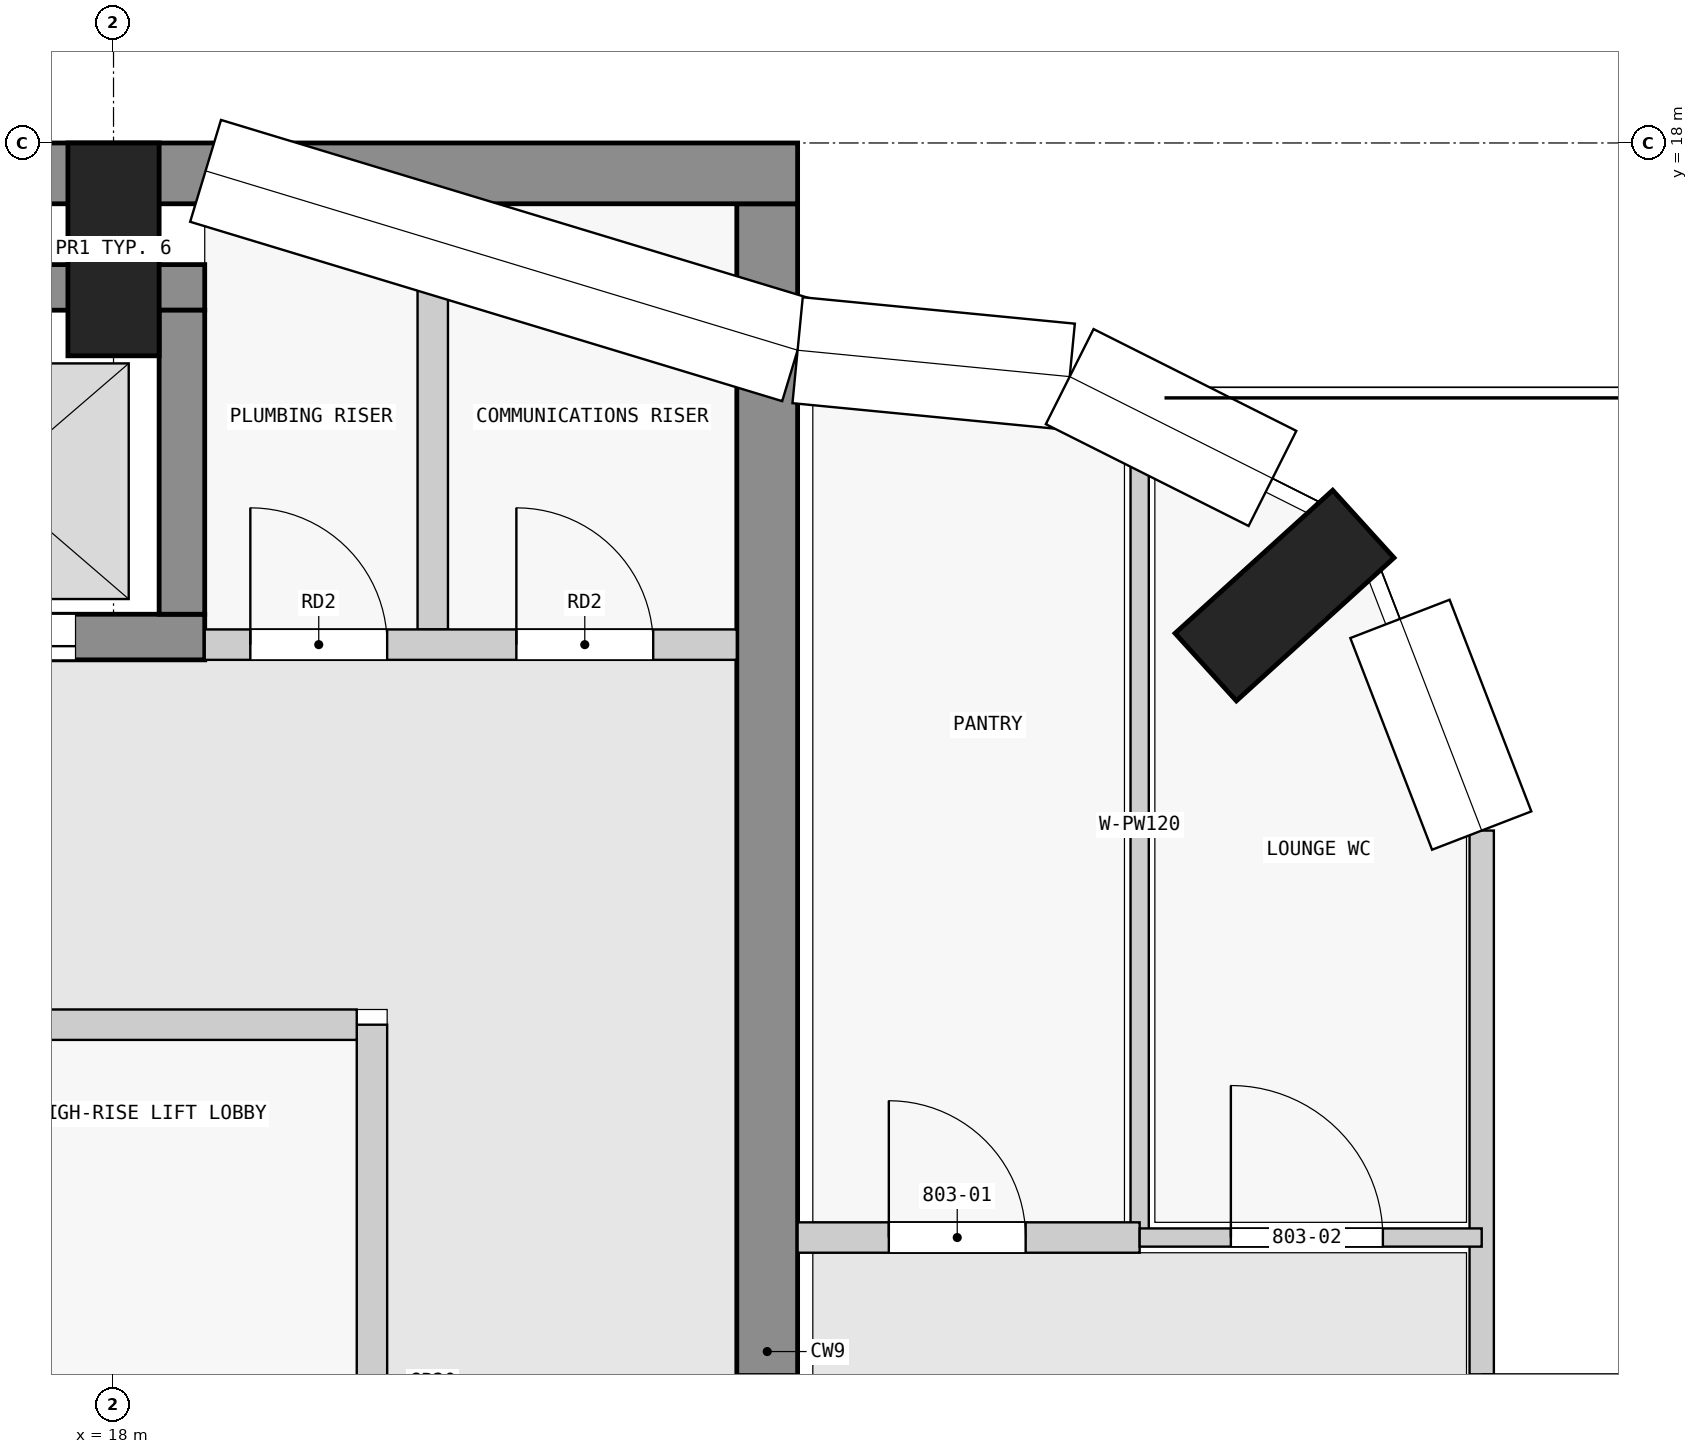
"""IFC4 building model, lengths in metres.
Left out: names, types, materials, properties, quantities, classifications, styles, units other than length and angle.
Written with IfcOpenShell. Run it as: python <this file> out.ifc"""

import sys

from ifc_helpers import new_model, si_unit, direction, frame, frame_2d, origin, origin_2d, place, context, subcontext, project, spatial, rectangle, extrude, element, fill, save


model = new_model("IFC4")
c1 = context("Model", 3, precision=1e-05, world=origin(), true_north=direction((0.0, 1.0)))
c2 = subcontext(c1, "Body", "Model", "MODEL_VIEW")
j1 = project(units=[si_unit("LENGTHUNIT", "METRE"), si_unit("PLANEANGLEUNIT", "RADIAN")], contexts=[c1])
p1 = place(None, origin())
s1 = spatial("IfcSite", under=j1, at=p1, CompositionType="ELEMENT")
p2 = place(p1, origin())
s2 = spatial("IfcBuilding", under=s1, at=p2, CompositionType="ELEMENT")
p3 = place(p2, frame((0.0, 0.0, 301.9)))
s3 = spatial("IfcBuildingStorey", under=s2, at=p3, CompositionType="ELEMENT", Elevation=301.9)
for number, where, z_axis, x_axis in (
    (1, (25.703, 15.023, 0.0), (0.0, 0.0, 1.0), (-0.672, 0.74, 0.0)),
    (2, (18.0, 17.3, 0.0), (0.0, 0.0, 1.0), (1.0, 0.0, 0.0)),
):
    element("IfcColumn", number, at=place(p3, frame(where, z_axis=z_axis, x_axis=x_axis)), inside=s3, PredefinedType="COLUMN", context=c2, shape_type="SweptSolid", body=[
        extrude(rectangle(XDim=0.6, YDim=1.4, at=origin_2d()), origin(), (0.0, 0.0, 1.0), 3.5),
    ])
p4 = place(p3, frame((1.9, 17.8, 0.0), z_axis=(0.0, 0.0, 1.0), x_axis=(1.0, 0.0, 0.0)))
e3 = element("IfcWall", 3, at=p4, inside=s3, PredefinedType="SHEAR", context=c2, shape_type="SweptSolid", body=[
    extrude(rectangle(XDim=20.6, YDim=0.4, at=frame_2d((10.3, 0.0))), origin(), (0.0, 0.0, 1.0), 3.25),
])
p5 = place(p3, frame((22.3, 2.5, 0.0), z_axis=(0.0, 0.0, 1.0), x_axis=(0.0, 1.0, 0.0)))
e4 = element("IfcWall", 4, at=p5, inside=s3, PredefinedType="SHEAR", context=c2, shape_type="SweptSolid", body=[
    extrude(rectangle(XDim=15.1, YDim=0.4, at=frame_2d((7.55, 0.0))), origin(), (0.0, 0.0, 1.0), 3.25),
])
p6 = place(p5, frame((5.6, 0.0, 0.0)))
e5 = element("IfcOpeningElement", 5, at=p6, cuts=e4, PredefinedType="OPENING", context=c2, shape_type="SweptSolid", body=[
    extrude(rectangle(XDim=1.8, YDim=2.1, at=frame_2d((0.9, 1.05))), frame((0.0, 0.21, 0.0), z_axis=(0.0, -1.0, 0.0), x_axis=(1.0, 0.0, 0.0)), (0.0, 0.0, 1.0), 0.42),
])
p7 = place(p3, frame((10.8, 17.05, 0.0), z_axis=(0.0, 0.0, 1.0), x_axis=(1.0, 0.0, 0.0)))
e6 = element("IfcWall", 6, at=p7, inside=s3, PredefinedType="SHEAR", context=c2, shape_type="SweptSolid", body=[
    extrude(rectangle(XDim=7.8, YDim=0.3, at=frame_2d((3.9, 0.0))), origin(), (0.0, 0.0, 1.0), 3.25),
])
p8 = place(p3, frame((10.8, 14.75, 0.0), z_axis=(0.0, 0.0, 1.0), x_axis=(1.0, 0.0, 0.0)))
e7 = element("IfcWall", 7, at=p8, inside=s3, PredefinedType="SHEAR", context=c2, shape_type="SweptSolid", body=[
    extrude(rectangle(XDim=7.8, YDim=0.3, at=frame_2d((3.9, 0.0))), origin(), (0.0, 0.0, 1.0), 3.25),
])
p9 = place(p8, frame((0.85, 0.0, 0.0)))
e8 = element("IfcOpeningElement", 8, at=p9, cuts=e7, PredefinedType="OPENING", context=c2, shape_type="SweptSolid", body=[
    extrude(rectangle(XDim=1.1, YDim=2.1, at=frame_2d((0.55, 1.05))), frame((0.0, 0.16, 0.0), z_axis=(0.0, -1.0, 0.0), x_axis=(1.0, 0.0, 0.0)), (0.0, 0.0, 1.0), 0.32),
])
p10 = place(p8, frame((3.35, 0.0, 0.0)))
e9 = element("IfcOpeningElement", 9, at=p10, cuts=e7, PredefinedType="OPENING", context=c2, shape_type="SweptSolid", body=[
    extrude(rectangle(XDim=1.1, YDim=2.1, at=frame_2d((0.55, 1.05))), frame((0.0, 0.16, 0.0), z_axis=(0.0, -1.0, 0.0), x_axis=(1.0, 0.0, 0.0)), (0.0, 0.0, 1.0), 0.32),
])
p11 = place(p8, frame((5.85, 0.0, 0.0)))
e10 = element("IfcOpeningElement", 10, at=p11, cuts=e7, PredefinedType="OPENING", context=c2, shape_type="SweptSolid", body=[
    extrude(rectangle(XDim=1.1, YDim=2.1, at=frame_2d((0.55, 1.05))), frame((0.0, 0.16, 0.0), z_axis=(0.0, -1.0, 0.0), x_axis=(1.0, 0.0, 0.0)), (0.0, 0.0, 1.0), 0.32),
])
p12 = place(p3, frame((18.45, 14.9, 0.0), z_axis=(0.0, 0.0, 1.0), x_axis=(0.0, 1.0, 0.0)))
e11 = element("IfcWall", 11, at=p12, inside=s3, PredefinedType="SHEAR", context=c2, shape_type="SweptSolid", body=[
    extrude(rectangle(XDim=2.0, YDim=0.3, at=frame_2d((1.0, 0.0))), origin(), (0.0, 0.0, 1.0), 3.25),
])
p13 = place(p3, frame((27.0, 13.477, 0.0), z_axis=(0.0, 0.0, 1.0), x_axis=(0.0, -1.0, 0.0)))
e12 = element("IfcWall", 12, at=p13, inside=s3, PredefinedType="STANDARD", context=c2, shape_type="SweptSolid", body=[
    extrude(rectangle(XDim=8.954, YDim=0.16, at=frame_2d((4.477, 0.0))), origin(), (0.0, 0.0, 1.0), 3.25),
])
p14 = place(p13, frame((3.577, 0.0, 0.0)))
e13 = element("IfcOpeningElement", 13, at=p14, cuts=e12, PredefinedType="OPENING", context=c2, shape_type="SweptSolid", body=[
    extrude(rectangle(XDim=1.8, YDim=2.4, at=frame_2d((0.9, 1.2))), frame((0.0, 0.09, 0.0), z_axis=(0.0, -1.0, 0.0), x_axis=(1.0, 0.0, 0.0)), (0.0, 0.0, 1.0), 0.18),
])
p15 = place(p3, frame((19.7, 7.5, 0.0), z_axis=(0.0, 0.0, 1.0), x_axis=(0.0, 1.0, 0.0)))
e14 = element("IfcWall", 14, at=p15, inside=s3, PredefinedType="PARTITIONING", context=c2, shape_type="SweptSolid", body=[
    extrude(rectangle(XDim=4.7, YDim=0.2, at=frame_2d((2.35, 0.0))), origin(), (0.0, 0.0, 1.0), 3.25),
])
p16 = place(p3, frame((10.9, 12.2, 0.0), z_axis=(0.0, 0.0, 1.0), x_axis=(1.0, 0.0, 0.0)))
e15 = element("IfcWall", 15, at=p16, inside=s3, PredefinedType="PARTITIONING", context=c2, shape_type="SweptSolid", body=[
    extrude(rectangle(XDim=8.7, YDim=0.2, at=frame_2d((4.35, 0.0))), origin(), (0.0, 0.0, 1.0), 3.25),
])
p17 = place(p16, frame((3.9, 0.0, 0.0)))
e16 = element("IfcOpeningElement", 16, at=p17, cuts=e15, PredefinedType="OPENING", context=c2, shape_type="SweptSolid", body=[
    extrude(rectangle(XDim=0.9, YDim=2.1, at=frame_2d((0.45, 1.05))), frame((0.0, 0.11, 0.0), z_axis=(0.0, -1.0, 0.0), x_axis=(1.0, 0.0, 0.0)), (0.0, 0.0, 1.0), 0.22),
])
p18 = place(p3, frame((18.6, 14.7, 0.0), z_axis=(0.0, 0.0, 1.0), x_axis=(1.0, 0.0, 0.0)))
e17 = element("IfcWall", 17, at=p18, inside=s3, PredefinedType="PARTITIONING", context=c2, shape_type="SweptSolid", body=[
    extrude(rectangle(XDim=3.5, YDim=0.2, at=frame_2d((1.75, 0.0))), origin(), (0.0, 0.0, 1.0), 3.25),
])
p19 = place(p18, frame((0.3, 0.0, 0.0)))
e18 = element("IfcOpeningElement", 18, at=p19, cuts=e17, PredefinedType="OPENING", context=c2, shape_type="SweptSolid", body=[
    extrude(rectangle(XDim=0.9, YDim=2.1, at=frame_2d((0.45, 1.05))), frame((0.0, 0.11, 0.0), z_axis=(0.0, -1.0, 0.0), x_axis=(1.0, 0.0, 0.0)), (0.0, 0.0, 1.0), 0.22),
])
p20 = place(p18, frame((2.05, 0.0, 0.0)))
e19 = element("IfcOpeningElement", 19, at=p20, cuts=e17, PredefinedType="OPENING", context=c2, shape_type="SweptSolid", body=[
    extrude(rectangle(XDim=0.9, YDim=2.1, at=frame_2d((0.45, 1.05))), frame((0.0, 0.11, 0.0), z_axis=(0.0, -1.0, 0.0), x_axis=(1.0, 0.0, 0.0)), (0.0, 0.0, 1.0), 0.22),
])
p21 = place(p3, frame((20.1, 14.8, 0.0), z_axis=(0.0, 0.0, 1.0), x_axis=(0.0, 1.0, 0.0)))
e20 = element("IfcWall", 20, at=p21, inside=s3, PredefinedType="PARTITIONING", context=c2, shape_type="SweptSolid", body=[
    extrude(rectangle(XDim=2.8, YDim=0.2, at=frame_2d((1.4, 0.0))), origin(), (0.0, 0.0, 1.0), 3.25),
])
p22 = place(p3, frame((24.75, 16.232, 0.0), z_axis=(0.0, 0.0, 1.0), x_axis=(0.0, -1.0, 0.0)))
e21 = element("IfcWall", 21, at=p22, inside=s3, PredefinedType="PARTITIONING", context=c2, shape_type="SweptSolid", body=[
    extrude(rectangle(XDim=5.432, YDim=0.12, at=frame_2d((2.716, 0.0))), origin(), (0.0, 0.0, 1.0), 2.797),
])
p23 = place(p3, frame((22.5, 10.8, 0.0), z_axis=(0.0, 0.0, 1.0), x_axis=(1.0, 0.0, 0.0)))
e22 = element("IfcWall", 22, at=p23, inside=s3, PredefinedType="PARTITIONING", context=c2, shape_type="SweptSolid", body=[
    extrude(rectangle(XDim=2.25, YDim=0.2, at=frame_2d((1.125, 0.0))), origin(), (0.0, 0.0, 1.0), 3.25),
])
p24 = place(p23, frame((0.6, 0.0, 0.0)))
e23 = element("IfcOpeningElement", 23, at=p24, cuts=e22, PredefinedType="OPENING", context=c2, shape_type="SweptSolid", body=[
    extrude(rectangle(XDim=0.9, YDim=2.1, at=frame_2d((0.45, 1.05))), frame((0.0, 0.11, 0.0), z_axis=(0.0, -1.0, 0.0), x_axis=(1.0, 0.0, 0.0)), (0.0, 0.0, 1.0), 0.22),
])
p25 = place(p3, frame((24.75, 10.8, 0.0), z_axis=(0.0, 0.0, 1.0), x_axis=(1.0, 0.0, 0.0)))
e24 = element("IfcWall", 24, at=p25, inside=s3, PredefinedType="PARTITIONING", context=c2, shape_type="SweptSolid", body=[
    extrude(rectangle(XDim=2.25, YDim=0.12, at=frame_2d((1.125, 0.0))), origin(), (0.0, 0.0, 1.0), 2.642),
])
p26 = place(p25, frame((0.6, 0.0, 0.0)))
e25 = element("IfcOpeningElement", 25, at=p26, cuts=e24, PredefinedType="OPENING", context=c2, shape_type="SweptSolid", body=[
    extrude(rectangle(XDim=1.0, YDim=2.1, at=frame_2d((0.5, 1.05))), frame((0.0, 0.07, 0.0), z_axis=(0.0, -1.0, 0.0), x_axis=(1.0, 0.0, 0.0)), (0.0, 0.0, 1.0), 0.14),
])
p27 = place(p14, origin())
e26 = element("IfcDoor", 26, at=p27, inside=s3, OperationType="SINGLE_SWING_LEFT", PredefinedType="DOOR", context=c2, shape_type="SweptSolid", body=[
    extrude(rectangle(XDim=1.8, YDim=2.4, at=frame_2d((0.9, 1.2))), frame((0.0, 0.025, 0.0), z_axis=(0.0, -1.0, 0.0), x_axis=(1.0, 0.0, 0.0)), (0.0, 0.0, 1.0), 0.05),
])
fill(e13, e26)
p28 = place(p11, origin())
e27 = element("IfcDoor", 27, at=p28, inside=s3, OperationType="DOUBLE_DOOR_SLIDING", PredefinedType="DOOR", context=c2, shape_type="SweptSolid", body=[
    extrude(rectangle(XDim=1.1, YDim=2.1, at=frame_2d((0.55, 1.05))), frame((0.0, 0.025, 0.0), z_axis=(0.0, -1.0, 0.0), x_axis=(1.0, 0.0, 0.0)), (0.0, 0.0, 1.0), 0.05),
])
fill(e10, e27)
p29 = place(p6, origin())
e28 = element("IfcDoor", 28, at=p29, inside=s3, OperationType="DOUBLE_DOOR_SINGLE_SWING", PredefinedType="DOOR", context=c2, shape_type="SweptSolid", body=[
    extrude(rectangle(XDim=1.8, YDim=2.1, at=frame_2d((0.9, 1.05))), frame((0.0, 0.025, 0.0), z_axis=(0.0, -1.0, 0.0), x_axis=(1.0, 0.0, 0.0)), (0.0, 0.0, 1.0), 0.05),
])
fill(e5, e28)
p30 = place(p19, origin())
e29 = element("IfcDoor", 29, at=p30, inside=s3, OperationType="SINGLE_SWING_LEFT", PredefinedType="DOOR", context=c2, shape_type="SweptSolid", body=[
    extrude(rectangle(XDim=0.9, YDim=2.1, at=frame_2d((0.45, 1.05))), frame((0.0, 0.025, 0.0), z_axis=(0.0, -1.0, 0.0), x_axis=(1.0, 0.0, 0.0)), (0.0, 0.0, 1.0), 0.05),
])
fill(e18, e29)
p31 = place(p20, origin())
e30 = element("IfcDoor", 30, at=p31, inside=s3, OperationType="SINGLE_SWING_LEFT", PredefinedType="DOOR", context=c2, shape_type="SweptSolid", body=[
    extrude(rectangle(XDim=0.9, YDim=2.1, at=frame_2d((0.45, 1.05))), frame((0.0, 0.025, 0.0), z_axis=(0.0, -1.0, 0.0), x_axis=(1.0, 0.0, 0.0)), (0.0, 0.0, 1.0), 0.05),
])
fill(e19, e30)
p32 = place(p24, origin())
e31 = element("IfcDoor", 31, at=p32, inside=s3, OperationType="SINGLE_SWING_LEFT", PredefinedType="DOOR", context=c2, shape_type="SweptSolid", body=[
    extrude(rectangle(XDim=0.9, YDim=2.1, at=frame_2d((0.45, 1.05))), frame((0.0, 0.025, 0.0), z_axis=(0.0, -1.0, 0.0), x_axis=(1.0, 0.0, 0.0)), (0.0, 0.0, 1.0), 0.05),
])
fill(e23, e31)
p33 = place(p26, origin())
e32 = element("IfcDoor", 32, at=p33, inside=s3, OperationType="SINGLE_SWING_LEFT", PredefinedType="DOOR", context=c2, shape_type="SweptSolid", body=[
    extrude(rectangle(XDim=1.0, YDim=2.1, at=frame_2d((0.5, 1.05))), frame((0.0, 0.025, 0.0), z_axis=(0.0, -1.0, 0.0), x_axis=(1.0, 0.0, 0.0)), (0.0, 0.0, 1.0), 0.05),
])
fill(e25, e32)
save(model, sys.argv[1])
